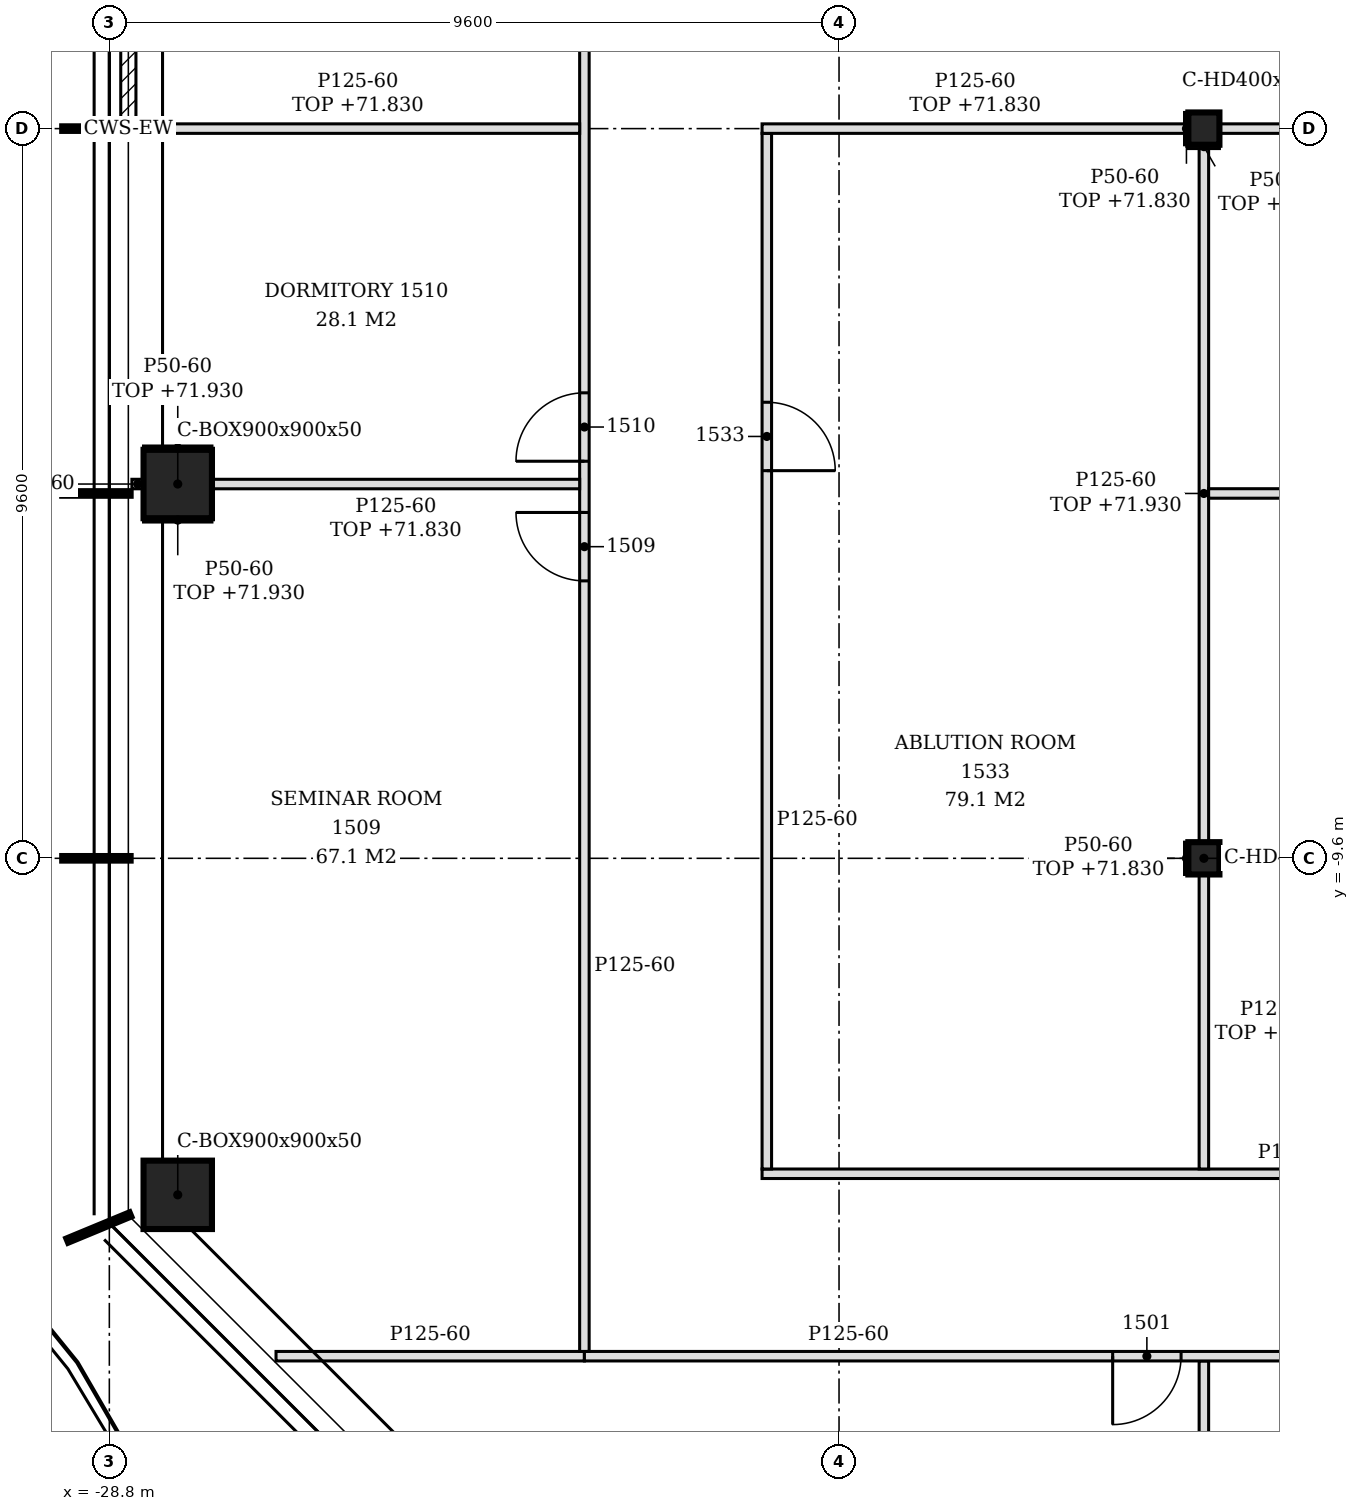
"""IFC4 building model, lengths in metres.
Left out: names, types, materials, properties, quantities, classifications, styles, units other than length and angle.
Written with IfcOpenShell. Run it as: python <this file> out.ifc"""

import sys

from ifc_helpers import new_model, si_unit, direction, frame, frame_2d, origin, origin_2d, place, context, subcontext, project, spatial, polyline, rectangle, hollow_rectangle, i_section, outline, extrude, element, fill, save


model = new_model("IFC4")
c1 = context("Model", 3, precision=1e-05, world=origin(), true_north=direction((0.0, 1.0)))
c2 = subcontext(c1, "Body", "Model", "MODEL_VIEW")
j1 = project(units=[si_unit("LENGTHUNIT", "METRE"), si_unit("PLANEANGLEUNIT", "RADIAN")], contexts=[c1])
p1 = place(None, origin())
s1 = spatial("IfcSite", under=j1, at=p1, CompositionType="ELEMENT")
p2 = place(p1, origin())
s2 = spatial("IfcBuilding", under=s1, at=p2, CompositionType="ELEMENT")
p3 = place(p2, frame((0.0, 0.0, 69.0)))
s3 = spatial("IfcBuildingStorey", under=s2, at=p3, CompositionType="ELEMENT", Elevation=69.0)
for number, where, z_axis, x_axis in (
    (1, (-27.9, -4.676, -0.15), (0.0, 0.0, 1.0), (1.0, 0.0, 0.0)),
    (2, (-27.9, -14.027, -0.15), (0.0, 0.0, 1.0), (1.0, 0.0, 0.0)),
):
    element("IfcColumn", number, at=place(p3, frame(where, z_axis=z_axis, x_axis=x_axis)), inside=s3, PredefinedType="COLUMN", context=c2, shape_type="SweptSolid", body=[
        extrude(hollow_rectangle(XDim=0.9, YDim=0.9, WallThickness=0.05, at=origin_2d()), origin(), (0.0, 0.0, 1.0), 3.6),
    ])
for number, where, z_axis, x_axis in (
    (3, (-14.4, -9.6, -0.15), (0.0, 0.0, 1.0), (1.0, 0.0, 0.0)),
    (4, (-14.4, 0.0, -0.15), (0.0, 0.0, 1.0), (1.0, 0.0, 0.0)),
):
    element("IfcColumn", number, at=place(p3, frame(where, z_axis=z_axis, x_axis=x_axis)), inside=s3, PredefinedType="COLUMN", context=c2, shape_type="SweptSolid", body=[
        extrude(i_section(OverallWidth=0.409, OverallDepth=0.425, WebThickness=0.033, FlangeThickness=0.052, FilletRadius=0.015, at=origin_2d()), origin(), (0.0, 0.0, 1.0), 3.6),
    ])
p4 = place(p3, frame((-28.55, 4.77, 0.0), z_axis=(0.0, 0.0, 1.0), x_axis=(0.0, -1.0, 0.0)))
e5 = element("IfcWall", 5, at=p4, inside=s3, PredefinedType="NOTDEFINED", context=c2, shape_type="SweptSolid", body=[
    extrude(rectangle(XDim=4.74, YDim=0.2, at=frame_2d((2.37, 0.0))), origin(), (0.0, 0.0, 1.0), 3.45),
])
p5 = place(p4, frame((1.47, 0.0, 0.0)))
e6 = element("IfcOpeningElement", 6, at=p5, cuts=e5, PredefinedType="OPENING", context=c2, shape_type="SweptSolid", body=[
    extrude(rectangle(XDim=1.8, YDim=2.4, at=frame_2d((0.9, 1.2))), frame((0.0, 0.11, 0.0), z_axis=(0.0, -1.0, 0.0), x_axis=(1.0, 0.0, 0.0)), (0.0, 0.0, 1.0), 0.22),
])
p6 = place(p3, frame((-14.4, -18.988, 0.0), z_axis=(0.0, 0.0, 1.0), x_axis=(0.0, 1.0, 0.0)))
e7 = element("IfcWall", 7, at=p6, inside=s3, PredefinedType="PARTITIONING", context=c2, shape_type="SweptSolid", body=[
    extrude(rectangle(XDim=2.775, YDim=0.125, at=frame_2d((1.388, 0.0))), origin(), (0.0, 0.0, 1.0), 2.93),
])
p7 = place(p3, frame((-26.607, -16.15, 0.0), z_axis=(0.0, 0.0, 1.0), x_axis=(1.0, 0.0, 0.0)))
e8 = element("IfcWall", 8, at=p7, inside=s3, PredefinedType="PARTITIONING", context=c2, shape_type="SweptSolid", body=[
    extrude(outline(polyline([(0.0, 0.0), (4.057, 0.0), (4.057, 3.45), (1.104, 3.45), (1.102, 2.93), (0.555, 2.93), (0.553, 3.45), (0.0, 3.45), (0.0, 0.0)])), frame((0.0, 0.062, 0.0), z_axis=(0.0, -1.0, 0.0), x_axis=(1.0, 0.0, 0.0)), (0.0, 0.0, 1.0), 0.125),
])
p8 = place(p3, frame((-22.55, -16.15, 0.0), z_axis=(0.0, 0.0, 1.0), x_axis=(1.0, 0.0, 0.0)))
e9 = element("IfcWall", 9, at=p8, inside=s3, PredefinedType="PARTITIONING", context=c2, shape_type="SweptSolid", body=[
    extrude(outline(polyline([(0.0, 0.0), (41.688, 0.0), (41.688, 2.73), (41.6, 2.73), (41.598, 3.45), (29.9, 3.45), (29.898, 2.73), (29.6, 2.73), (29.598, 3.45), (17.9, 3.45), (17.898, 2.73), (17.6, 2.73), (17.598, 3.45), (8.3, 3.45), (8.298, 2.93), (8.0, 2.93), (7.998, 3.45), (0.0, 3.45), (0.0, 0.0)])), frame((0.0, 0.062, 0.0), z_axis=(0.0, -1.0, 0.0), x_axis=(1.0, 0.0, 0.0)), (0.0, 0.0, 1.0), 0.125),
])
p9 = place(p8, frame((6.95, 0.0, 0.0)))
e10 = element("IfcOpeningElement", 10, at=p9, cuts=e9, PredefinedType="OPENING", context=c2, shape_type="SweptSolid", body=[
    extrude(rectangle(XDim=0.9, YDim=2.1, at=frame_2d((0.45, 1.05))), frame((0.0, 0.073, 0.0), z_axis=(0.0, -1.0, 0.0), x_axis=(1.0, 0.0, 0.0)), (0.0, 0.0, 1.0), 0.145),
])
p10 = place(p8, frame((11.936, 0.0, 0.0)))
e11 = element("IfcOpeningElement", 11, at=p10, cuts=e9, PredefinedType="OPENING", context=c2, shape_type="SweptSolid", body=[
    extrude(rectangle(XDim=0.9, YDim=2.1, at=frame_2d((0.45, 1.05))), frame((0.0, 0.073, 0.0), z_axis=(0.0, -1.0, 0.0), x_axis=(1.0, 0.0, 0.0)), (0.0, 0.0, 1.0), 0.145),
])
p11 = place(p8, frame((16.55, 0.0, 0.0)))
e12 = element("IfcOpeningElement", 12, at=p11, cuts=e9, PredefinedType="OPENING", context=c2, shape_type="SweptSolid", body=[
    extrude(rectangle(XDim=0.9, YDim=2.1, at=frame_2d((0.45, 1.05))), frame((0.0, 0.073, 0.0), z_axis=(0.0, -1.0, 0.0), x_axis=(1.0, 0.0, 0.0)), (0.0, 0.0, 1.0), 0.145),
])
p12 = place(p8, frame((21.35, 0.0, 0.0)))
e13 = element("IfcOpeningElement", 13, at=p12, cuts=e9, PredefinedType="OPENING", context=c2, shape_type="SweptSolid", body=[
    extrude(rectangle(XDim=0.9, YDim=2.1, at=frame_2d((0.45, 1.05))), frame((0.0, 0.073, 0.0), z_axis=(0.0, -1.0, 0.0), x_axis=(1.0, 0.0, 0.0)), (0.0, 0.0, 1.0), 0.145),
])
p13 = place(p8, frame((26.15, 0.0, 0.0)))
e14 = element("IfcOpeningElement", 14, at=p13, cuts=e9, PredefinedType="OPENING", context=c2, shape_type="SweptSolid", body=[
    extrude(rectangle(XDim=0.9, YDim=2.1, at=frame_2d((0.45, 1.05))), frame((0.0, 0.073, 0.0), z_axis=(0.0, -1.0, 0.0), x_axis=(1.0, 0.0, 0.0)), (0.0, 0.0, 1.0), 0.145),
])
p14 = place(p8, frame((30.764, 0.0, 0.0)))
e15 = element("IfcOpeningElement", 15, at=p14, cuts=e9, PredefinedType="OPENING", context=c2, shape_type="SweptSolid", body=[
    extrude(rectangle(XDim=0.9, YDim=2.1, at=frame_2d((0.45, 1.05))), frame((0.0, 0.073, 0.0), z_axis=(0.0, -1.0, 0.0), x_axis=(1.0, 0.0, 0.0)), (0.0, 0.0, 1.0), 0.145),
])
p15 = place(p8, frame((32.35, 0.0, 0.0)))
e16 = element("IfcOpeningElement", 16, at=p15, cuts=e9, PredefinedType="OPENING", context=c2, shape_type="SweptSolid", body=[
    extrude(rectangle(XDim=0.9, YDim=2.1, at=frame_2d((0.45, 1.05))), frame((0.0, 0.073, 0.0), z_axis=(0.0, -1.0, 0.0), x_axis=(1.0, 0.0, 0.0)), (0.0, 0.0, 1.0), 0.145),
])
p16 = place(p8, frame((37.25, 0.0, 0.0)))
e17 = element("IfcOpeningElement", 17, at=p16, cuts=e9, PredefinedType="OPENING", context=c2, shape_type="SweptSolid", body=[
    extrude(rectangle(XDim=0.9, YDim=2.1, at=frame_2d((0.45, 1.05))), frame((0.0, 0.073, 0.0), z_axis=(0.0, -1.0, 0.0), x_axis=(1.0, 0.0, 0.0)), (0.0, 0.0, 1.0), 0.145),
])
p17 = place(p3, frame((-22.55, -16.087, 0.0), z_axis=(0.0, 0.0, 1.0), x_axis=(0.0, 1.0, 0.0)))
e18 = element("IfcWall", 18, at=p17, inside=s3, PredefinedType="PARTITIONING", context=c2, shape_type="SweptSolid", body=[
    extrude(outline(polyline([(0.0, 0.0), (36.276, 0.0), (36.276, 3.45), (36.022, 3.45), (36.02, 2.63), (34.907, 2.63), (34.905, 3.45), (30.597, 3.45), (30.595, 2.83), (30.377, 2.83), (30.375, 3.45), (25.798, 3.45), (25.795, 2.83), (25.577, 2.83), (25.575, 3.45), (20.998, 3.45), (20.996, 2.83), (20.778, 2.83), (20.775, 3.45), (16.198, 3.45), (16.196, 2.83), (15.978, 2.83), (15.976, 3.45), (11.397, 3.45), (11.396, 2.83), (11.177, 2.83), (11.176, 3.45), (6.597, 3.45), (6.595, 2.83), (6.377, 2.83), (6.375, 3.45), (1.798, 3.45), (1.795, 2.83), (1.577, 2.83), (1.575, 3.45), (0.0, 3.45), (0.0, 0.0)])), frame((0.0, 0.062, 0.0), z_axis=(0.0, -1.0, 0.0), x_axis=(1.0, 0.0, 0.0)), (0.0, 0.0, 1.0), 0.125),
])
p18 = place(p17, frame((10.137, 0.0, 0.0)))
e19 = element("IfcOpeningElement", 19, at=p18, cuts=e18, PredefinedType="OPENING", context=c2, shape_type="SweptSolid", body=[
    extrude(rectangle(XDim=0.9, YDim=2.1, at=frame_2d((0.45, 1.05))), frame((0.0, 0.073, 0.0), z_axis=(0.0, -1.0, 0.0), x_axis=(1.0, 0.0, 0.0)), (0.0, 0.0, 1.0), 0.145),
])
p19 = place(p17, frame((11.711, 0.0, 0.0)))
e20 = element("IfcOpeningElement", 20, at=p19, cuts=e18, PredefinedType="OPENING", context=c2, shape_type="SweptSolid", body=[
    extrude(rectangle(XDim=0.9, YDim=2.1, at=frame_2d((0.45, 1.05))), frame((0.0, 0.073, 0.0), z_axis=(0.0, -1.0, 0.0), x_axis=(1.0, 0.0, 0.0)), (0.0, 0.0, 1.0), 0.145),
])
p20 = place(p17, frame((17.288, 0.0, 0.0)))
e21 = element("IfcOpeningElement", 21, at=p20, cuts=e18, PredefinedType="OPENING", context=c2, shape_type="SweptSolid", body=[
    extrude(rectangle(XDim=0.9, YDim=2.1, at=frame_2d((0.45, 1.05))), frame((0.0, 0.073, 0.0), z_axis=(0.0, -1.0, 0.0), x_axis=(1.0, 0.0, 0.0)), (0.0, 0.0, 1.0), 0.145),
])
p21 = place(p17, frame((21.063, 0.0, 0.0)))
e22 = element("IfcOpeningElement", 22, at=p21, cuts=e18, PredefinedType="OPENING", context=c2, shape_type="SweptSolid", body=[
    extrude(rectangle(XDim=0.9, YDim=2.1, at=frame_2d((0.45, 1.05))), frame((0.0, 0.073, 0.0), z_axis=(0.0, -1.0, 0.0), x_axis=(1.0, 0.0, 0.0)), (0.0, 0.0, 1.0), 0.145),
])
p22 = place(p17, frame((27.188, 0.0, 0.0)))
e23 = element("IfcOpeningElement", 23, at=p22, cuts=e18, PredefinedType="OPENING", context=c2, shape_type="SweptSolid", body=[
    extrude(rectangle(XDim=0.9, YDim=2.1, at=frame_2d((0.45, 1.05))), frame((0.0, 0.073, 0.0), z_axis=(0.0, -1.0, 0.0), x_axis=(1.0, 0.0, 0.0)), (0.0, 0.0, 1.0), 0.145),
])
p23 = place(p17, frame((30.415, 0.0, 0.0)))
e24 = element("IfcOpeningElement", 24, at=p23, cuts=e18, PredefinedType="OPENING", context=c2, shape_type="SweptSolid", body=[
    extrude(rectangle(XDim=0.9, YDim=2.1, at=frame_2d((0.45, 1.05))), frame((0.0, 0.073, 0.0), z_axis=(0.0, -1.0, 0.0), x_axis=(1.0, 0.0, 0.0)), (0.0, 0.0, 1.0), 0.145),
])
p24 = place(p3, frame((-20.212, -13.75, 0.0), z_axis=(0.0, 0.0, 1.0), x_axis=(1.0, 0.0, 0.0)))
e25 = element("IfcWall", 25, at=p24, inside=s3, PredefinedType="PARTITIONING", context=c2, shape_type="SweptSolid", body=[
    extrude(outline(polyline([(0.0, 0.0), (20.275, 0.0), (20.275, 3.45), (15.562, 3.45), (15.561, 2.73), (15.262, 2.73), (15.26, 3.45), (5.962, 3.45), (5.96, 2.93), (5.663, 2.93), (5.66, 3.45), (0.0, 3.45), (0.0, 0.0)])), frame((0.0, 0.062, 0.0), z_axis=(0.0, -1.0, 0.0), x_axis=(1.0, 0.0, 0.0)), (0.0, 0.0, 1.0), 0.125),
])
p25 = place(p24, frame((14.113, 0.0, 0.0)))
e26 = element("IfcOpeningElement", 26, at=p25, cuts=e25, PredefinedType="OPENING", context=c2, shape_type="SweptSolid", body=[
    extrude(rectangle(XDim=0.9, YDim=2.1, at=frame_2d((0.45, 1.05))), frame((0.0, 0.073, 0.0), z_axis=(0.0, -1.0, 0.0), x_axis=(1.0, 0.0, 0.0)), (0.0, 0.0, 1.0), 0.145),
])
p26 = place(p3, frame((-20.15, -13.688, 0.0), z_axis=(0.0, 0.0, 1.0), x_axis=(0.0, 1.0, 0.0)))
e27 = element("IfcWall", 27, at=p26, inside=s3, PredefinedType="PARTITIONING", context=c2, shape_type="SweptSolid", body=[
    extrude(outline(polyline([(0.0, 0.0), (13.625, 0.0), (13.625, 2.83), (13.577, 2.83), (13.575, 3.45), (8.998, 3.45), (8.996, 2.83), (8.778, 2.83), (8.775, 3.45), (4.198, 3.45), (4.196, 2.83), (3.978, 2.83), (3.976, 3.45), (0.0, 3.45), (0.0, 0.0)])), frame((0.0, 0.062, 0.0), z_axis=(0.0, -1.0, 0.0), x_axis=(1.0, 0.0, 0.0)), (0.0, 0.0, 1.0), 0.125),
])
p27 = place(p26, frame((9.188, 0.0, 0.0)))
e28 = element("IfcOpeningElement", 28, at=p27, cuts=e27, PredefinedType="OPENING", context=c2, shape_type="SweptSolid", body=[
    extrude(rectangle(XDim=0.9, YDim=2.1, at=frame_2d((0.45, 1.05))), frame((0.0, 0.073, 0.0), z_axis=(0.0, -1.0, 0.0), x_axis=(1.0, 0.0, 0.0)), (0.0, 0.0, 1.0), 0.145),
])
p28 = place(p3, frame((-14.4, -13.688, 0.0), z_axis=(0.0, 0.0, 1.0), x_axis=(0.0, 1.0, 0.0)))
e29 = element("IfcWall", 29, at=p28, inside=s3, PredefinedType="PARTITIONING", context=c2, shape_type="SweptSolid", body=[
    extrude(rectangle(XDim=3.875, YDim=0.125, at=frame_2d((1.938, 0.0))), origin(), (0.0, 0.0, 1.0), 2.93),
])
p29 = place(p3, frame((-14.4, -9.387, 0.0), z_axis=(0.0, 0.0, 1.0), x_axis=(0.0, 1.0, 0.0)))
e30 = element("IfcWall", 30, at=p29, inside=s3, PredefinedType="PARTITIONING", context=c2, shape_type="SweptSolid", body=[
    extrude(rectangle(XDim=9.175, YDim=0.125, at=frame_2d((4.587, 0.0))), origin(), (0.0, 0.0, 1.0), 2.93),
])
p30 = place(p3, frame((-14.337, -4.8, 0.0), z_axis=(0.0, 0.0, 1.0), x_axis=(1.0, 0.0, 0.0)))
e31 = element("IfcWall", 31, at=p30, inside=s3, PredefinedType="PARTITIONING", context=c2, shape_type="SweptSolid", body=[
    extrude(outline(polyline([(0.0, 0.0), (9.475, 0.0), (9.475, 2.83), (9.387, 2.83), (9.385, 2.93), (0.0, 2.93), (0.0, 0.0)])), frame((0.0, 0.062, 0.0), z_axis=(0.0, -1.0, 0.0), x_axis=(1.0, 0.0, 0.0)), (0.0, 0.0, 1.0), 0.125),
])
p31 = place(p3, frame((-28.503, -4.676, 0.0), z_axis=(0.0, 0.0, 1.0), x_axis=(1.0, 0.0, 0.0)))
e32 = element("IfcWall", 32, at=p31, inside=s3, PredefinedType="PARTITIONING", context=c2, shape_type="SweptSolid", body=[
    extrude(rectangle(XDim=0.153, YDim=0.125, at=frame_2d((0.076, 0.0))), origin(), (0.0, 0.0, 1.0), 3.45),
])
p32 = place(p3, frame((-27.45, -4.676, 0.0), z_axis=(0.0, 0.0, 1.0), x_axis=(1.0, 0.0, 0.0)))
e33 = element("IfcWall", 33, at=p32, inside=s3, PredefinedType="PARTITIONING", context=c2, shape_type="SweptSolid", body=[
    extrude(rectangle(XDim=4.837, YDim=0.125, at=frame_2d((2.419, 0.0))), origin(), (0.0, 0.0, 1.0), 2.83),
])
p33 = place(p3, frame((-28.45, 0.0, 0.0), z_axis=(0.0, 0.0, 1.0), x_axis=(1.0, 0.0, 0.0)))
e34 = element("IfcWall", 34, at=p33, inside=s3, PredefinedType="PARTITIONING", context=c2, shape_type="SweptSolid", body=[
    extrude(rectangle(XDim=5.837, YDim=0.125, at=frame_2d((2.919, 0.0))), origin(), (0.0, 0.0, 1.0), 2.83),
])
p34 = place(p3, frame((-20.212, 0.0, 0.0), z_axis=(0.0, 0.0, 1.0), x_axis=(1.0, 0.0, 0.0)))
e35 = element("IfcWall", 35, at=p34, inside=s3, PredefinedType="PARTITIONING", context=c2, shape_type="SweptSolid", body=[
    extrude(rectangle(XDim=5.608, YDim=0.125, at=frame_2d((2.804, 0.0))), origin(), (0.0, 0.0, 1.0), 2.83),
])
p35 = place(p3, frame((-14.196, 0.0, 0.0), z_axis=(0.0, 0.0, 1.0), x_axis=(1.0, 0.0, 0.0)))
e36 = element("IfcWall", 36, at=p35, inside=s3, PredefinedType="PARTITIONING", context=c2, shape_type="SweptSolid", body=[
    extrude(outline(polyline([(0.0, 0.0), (9.458, 0.0), (9.458, 2.83), (9.246, 2.83), (9.243, 2.93), (0.0, 2.93), (0.0, 0.0)])), frame((0.0, 0.062, 0.0), z_axis=(0.0, -1.0, 0.0), x_axis=(1.0, 0.0, 0.0)), (0.0, 0.0, 1.0), 0.125),
])
p36 = place(p35, frame((8.196, 0.0, 0.0)))
e37 = element("IfcOpeningElement", 37, at=p36, cuts=e36, PredefinedType="OPENING", context=c2, shape_type="SweptSolid", body=[
    extrude(rectangle(XDim=0.9, YDim=2.1, at=frame_2d((0.45, 1.05))), frame((0.0, 0.073, 0.0), z_axis=(0.0, -1.0, 0.0), x_axis=(1.0, 0.0, 0.0)), (0.0, 0.0, 1.0), 0.145),
])
p37 = place(p3, frame((-14.629, -9.812, 0.0), z_axis=(0.0, 0.0, 1.0), x_axis=(0.0, 1.0, 0.0)))
e38 = element("IfcWall", 38, at=p37, inside=s3, PredefinedType="PARTITIONING", context=c2, shape_type="SweptSolid", body=[
    extrude(rectangle(XDim=0.425, YDim=0.05, at=frame_2d((0.212, 0.0))), origin(), (0.0, 0.0, 1.0), 2.83),
])
p38 = place(p3, frame((-14.629, -0.212, 0.0), z_axis=(0.0, 0.0, 1.0), x_axis=(0.0, 1.0, 0.0)))
e39 = element("IfcWall", 39, at=p38, inside=s3, PredefinedType="PARTITIONING", context=c2, shape_type="SweptSolid", body=[
    extrude(rectangle(XDim=0.425, YDim=0.05, at=frame_2d((0.212, 0.0))), origin(), (0.0, 0.0, 1.0), 2.83),
])
for number, where, z_axis, x_axis in (
    (40, (-28.35, -4.201, 0.0), (0.0, 0.0, 1.0), (1.0, 0.0, 0.0)),
    (41, (-28.35, -5.151, 0.0), (0.0, 0.0, 1.0), (1.0, 0.0, 0.0)),
):
    element("IfcWall", number, at=place(p3, frame(where, z_axis=z_axis, x_axis=x_axis)), inside=s3, PredefinedType="PARTITIONING", context=c2, shape_type="SweptSolid", body=[
        extrude(rectangle(XDim=0.9, YDim=0.05, at=frame_2d((0.45, 0.0))), origin(), (0.0, 0.0, 1.0), 2.93),
    ])
p39 = place(p3, frame((-14.604, -0.238, 0.0), z_axis=(0.0, 0.0, 1.0), x_axis=(1.0, 0.0, 0.0)))
e42 = element("IfcWall", 42, at=p39, inside=s3, PredefinedType="PARTITIONING", context=c2, shape_type="SweptSolid", body=[
    extrude(rectangle(XDim=0.409, YDim=0.05, at=frame_2d((0.205, 0.0))), origin(), (0.0, 0.0, 1.0), 2.93),
])
p40 = place(p9, frame((0.9, 0.0, 0.0), z_axis=(0.0, 0.0, 1.0), x_axis=(-1.0, 0.0, 0.0)))
e43 = element("IfcDoor", 43, at=p40, inside=s3, OperationType="SINGLE_SWING_RIGHT", PredefinedType="DOOR", context=c2, shape_type="SweptSolid", body=[
    extrude(rectangle(XDim=0.9, YDim=2.1, at=frame_2d((0.45, 1.05))), frame((0.0, 0.025, 0.0), z_axis=(0.0, -1.0, 0.0), x_axis=(1.0, 0.0, 0.0)), (0.0, 0.0, 1.0), 0.05),
])
fill(e10, e43)
p41 = place(p18, origin())
e44 = element("IfcDoor", 44, at=p41, inside=s3, OperationType="SINGLE_SWING_RIGHT", PredefinedType="DOOR", context=c2, shape_type="SweptSolid", body=[
    extrude(rectangle(XDim=0.9, YDim=2.1, at=frame_2d((0.45, 1.05))), frame((0.0, 0.025, 0.0), z_axis=(0.0, -1.0, 0.0), x_axis=(1.0, 0.0, 0.0)), (0.0, 0.0, 1.0), 0.05),
])
fill(e19, e44)
p42 = place(p19, origin())
e45 = element("IfcDoor", 45, at=p42, inside=s3, OperationType="SINGLE_SWING_LEFT", PredefinedType="DOOR", context=c2, shape_type="SweptSolid", body=[
    extrude(rectangle(XDim=0.9, YDim=2.1, at=frame_2d((0.45, 1.05))), frame((0.0, 0.025, 0.0), z_axis=(0.0, -1.0, 0.0), x_axis=(1.0, 0.0, 0.0)), (0.0, 0.0, 1.0), 0.05),
])
fill(e20, e45)
p43 = place(p27, frame((0.9, 0.0, 0.0), z_axis=(0.0, 0.0, 1.0), x_axis=(-1.0, 0.0, 0.0)))
e46 = element("IfcDoor", 46, at=p43, inside=s3, OperationType="SINGLE_SWING_RIGHT", PredefinedType="DOOR", context=c2, shape_type="SweptSolid", body=[
    extrude(rectangle(XDim=0.9, YDim=2.1, at=frame_2d((0.45, 1.05))), frame((0.0, 0.025, 0.0), z_axis=(0.0, -1.0, 0.0), x_axis=(1.0, 0.0, 0.0)), (0.0, 0.0, 1.0), 0.05),
])
fill(e28, e46)
save(model, sys.argv[1])
